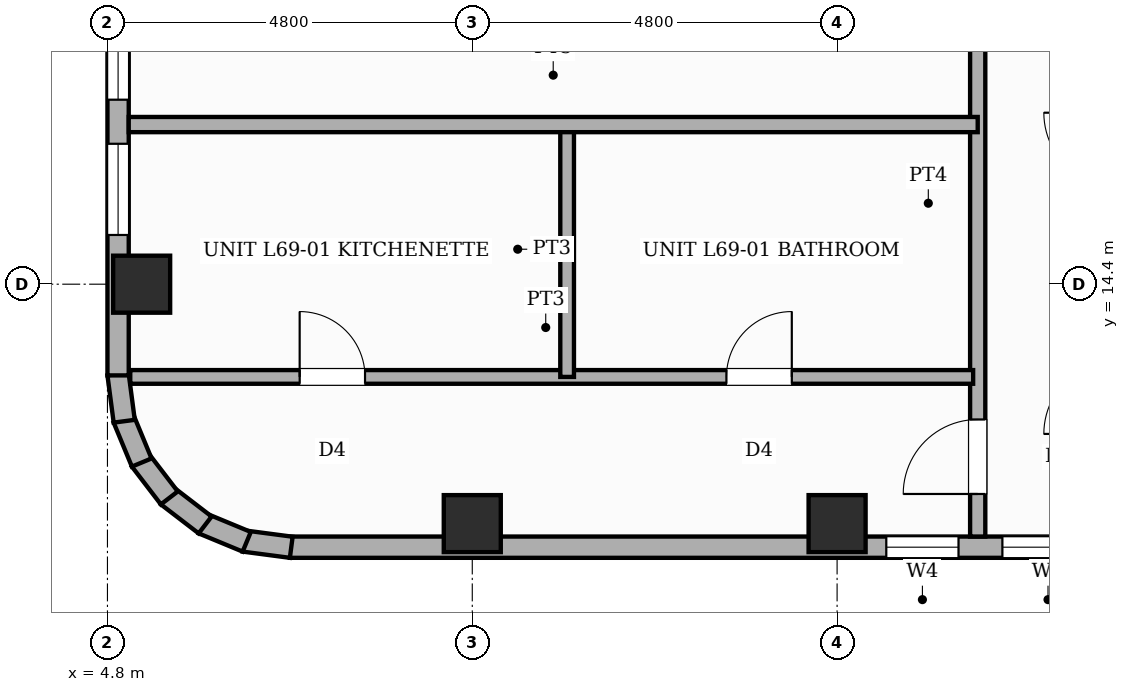
"""IFC4 building model, lengths in metres.
Left out: names, types, materials, properties, quantities, classifications, styles, units other than length and angle.
Written with IfcOpenShell. Run it as: python <this file> out.ifc"""

import sys

from ifc_helpers import new_model, si_unit, direction, frame, frame_2d, origin, origin_2d, place, context, subcontext, project, spatial, rectangle, extrude, element, fill, save


model = new_model("IFC4")
c1 = context("Model", 3, precision=1e-05, world=origin(), true_north=direction((0.0, 1.0)))
c2 = subcontext(c1, "Body", "Model", "MODEL_VIEW")
j1 = project(units=[si_unit("LENGTHUNIT", "METRE"), si_unit("PLANEANGLEUNIT", "RADIAN")], contexts=[c1])
p1 = place(None, origin())
s1 = spatial("IfcSite", under=j1, at=p1, CompositionType="ELEMENT")
p2 = place(p1, origin())
s2 = spatial("IfcBuilding", under=s1, at=p2, CompositionType="ELEMENT")
p3 = place(p2, frame((0.0, 0.0, 265.6)))
s3 = spatial("IfcBuildingStorey", under=s2, at=p3, CompositionType="ELEMENT", Elevation=265.6)
for number, where, z_axis, x_axis in (
    (1, (5.25, 14.4, 0.0), (0.0, 0.0, 1.0), (1.0, 0.0, 0.0)),
    (2, (9.6, 11.25, 0.0), (0.0, 0.0, 1.0), (1.0, 0.0, 0.0)),
    (3, (14.4, 11.25, 0.0), (0.0, 0.0, 1.0), (1.0, 0.0, 0.0)),
):
    element("IfcColumn", number, at=place(p3, frame(where, z_axis=z_axis, x_axis=x_axis)), inside=s3, PredefinedType="COLUMN", context=c2, shape_type="SweptSolid", body=[
        extrude(rectangle(XDim=0.75, YDim=0.75, at=origin_2d()), origin(), (0.0, 0.0, 1.0), 4.3),
    ])
p4 = place(p3, frame((21.6, 10.94, 0.0), z_axis=(0.0, 0.0, 1.0), x_axis=(-1.0, 0.0, 0.0)))
e4 = element("IfcWall", 4, at=p4, inside=s3, PredefinedType="STANDARD", context=c2, shape_type="SweptSolid", body=[
    extrude(rectangle(XDim=14.4, YDim=0.28, at=frame_2d((7.2, 0.0))), origin(), (0.0, 0.0, 1.0), 3.32),
])
p5 = place(p4, frame((5.603, 0.0, 0.8)))
e5 = element("IfcOpeningElement", 5, at=p5, cuts=e4, PredefinedType="OPENING", context=c2, shape_type="SweptSolid", body=[
    extrude(rectangle(XDim=0.95, YDim=1.8, at=frame_2d((0.475, 0.9))), frame((0.0, 0.15, 0.0), z_axis=(0.0, -1.0, 0.0), x_axis=(1.0, 0.0, 0.0)), (0.0, 0.0, 1.0), 0.3),
])
p6 = place(p4, frame((3.825, 0.0, 0.8)))
e6 = element("IfcOpeningElement", 6, at=p6, cuts=e4, PredefinedType="OPENING", context=c2, shape_type="SweptSolid", body=[
    extrude(rectangle(XDim=1.2, YDim=1.8, at=frame_2d((0.6, 0.9))), frame((0.0, 0.15, 0.0), z_axis=(0.0, -1.0, 0.0), x_axis=(1.0, 0.0, 0.0)), (0.0, 0.0, 1.0), 0.3),
])
p7 = place(p4, frame((0.433, 0.0, 0.8)))
e7 = element("IfcOpeningElement", 7, at=p7, cuts=e4, PredefinedType="OPENING", context=c2, shape_type="SweptSolid", body=[
    extrude(rectangle(XDim=1.2, YDim=1.8, at=frame_2d((0.6, 0.9))), frame((0.0, 0.15, 0.0), z_axis=(0.0, -1.0, 0.0), x_axis=(1.0, 0.0, 0.0)), (0.0, 0.0, 1.0), 0.3),
])
p8 = place(p3, frame((7.218, 10.939, 0.0), z_axis=(0.0, 0.0, 1.0), x_axis=(-0.9914410257, 0.130555323746, 0.0)))
e8 = element("IfcWall", 8, at=p8, inside=s3, PredefinedType="STANDARD", context=c2, shape_type="SweptSolid", body=[
    extrude(rectangle(XDim=0.626, YDim=0.28, at=frame_2d((0.313, 0.0))), origin(), (0.0, 0.0, 1.0), 4.04),
])
p9 = place(p3, frame((6.632, 11.011, 0.0), z_axis=(0.0, 0.0, 1.0), x_axis=(-0.923836271867, 0.382787856107, 0.0)))
e9 = element("IfcWall", 9, at=p9, inside=s3, PredefinedType="STANDARD", context=c2, shape_type="SweptSolid", body=[
    extrude(rectangle(XDim=0.626, YDim=0.28, at=frame_2d((0.313, 0.0))), origin(), (0.0, 0.0, 1.0), 4.04),
])
for number, where, z_axis, x_axis in (
    (10, (6.085, 11.233, 0.0), (0.0, 0.0, 1.0), (-0.793, 0.609, 0.0)),
    (11, (5.614, 11.588, 0.0), (0.0, 0.0, 1.0), (-0.609, 0.793, 0.0)),
):
    element("IfcWall", number, at=place(p3, frame(where, z_axis=z_axis, x_axis=x_axis)), inside=s3, PredefinedType="STANDARD", context=c2, shape_type="SweptSolid", body=[
        extrude(rectangle(XDim=0.626, YDim=0.28, at=frame_2d((0.313, 0.0))), origin(), (0.0, 0.0, 1.0), 4.04),
    ])
p10 = place(p3, frame((5.251, 12.054, 0.0), z_axis=(0.0, 0.0, 1.0), x_axis=(-0.382787856107, 0.923836271867, 0.0)))
e12 = element("IfcWall", 12, at=p10, inside=s3, PredefinedType="STANDARD", context=c2, shape_type="SweptSolid", body=[
    extrude(rectangle(XDim=0.626, YDim=0.28, at=frame_2d((0.313, 0.0))), origin(), (0.0, 0.0, 1.0), 4.04),
])
p11 = place(p3, frame((5.021, 12.597, 0.0), z_axis=(0.0, 0.0, 1.0), x_axis=(-0.130555323746, 0.9914410257, 0.0)))
e13 = element("IfcWall", 13, at=p11, inside=s3, PredefinedType="STANDARD", context=c2, shape_type="SweptSolid", body=[
    extrude(rectangle(XDim=0.626, YDim=0.28, at=frame_2d((0.313, 0.0))), origin(), (0.0, 0.0, 1.0), 4.04),
])
p12 = place(p3, frame((4.94, 13.2, 0.0), z_axis=(0.0, 0.0, 1.0), x_axis=(0.0, 1.0, 0.0)))
e14 = element("IfcWall", 14, at=p12, inside=s3, PredefinedType="STANDARD", context=c2, shape_type="SweptSolid", body=[
    extrude(rectangle(XDim=32.4, YDim=0.28, at=frame_2d((16.2, 0.0))), origin(), (0.0, 0.0, 1.0), 3.32),
])
p13 = place(p12, frame((8.1, 0.0, 0.0)))
e15 = element("IfcOpeningElement", 15, at=p13, cuts=e14, PredefinedType="OPENING", context=c2, shape_type="SweptSolid", body=[
    extrude(rectangle(XDim=1.1, YDim=2.15, at=frame_2d((0.55, 1.075))), frame((0.0, 0.15, 0.0), z_axis=(0.0, -1.0, 0.0), x_axis=(1.0, 0.0, 0.0)), (0.0, 0.0, 1.0), 0.3),
])
p14 = place(p12, frame((1.847, 0.0, 0.8)))
e16 = element("IfcOpeningElement", 16, at=p14, cuts=e14, PredefinedType="OPENING", context=c2, shape_type="SweptSolid", body=[
    extrude(rectangle(XDim=1.2, YDim=1.8, at=frame_2d((0.6, 0.9))), frame((0.0, 0.15, 0.0), z_axis=(0.0, -1.0, 0.0), x_axis=(1.0, 0.0, 0.0)), (0.0, 0.0, 1.0), 0.3),
])
p15 = place(p12, frame((3.627, 0.0, 0.8)))
e17 = element("IfcOpeningElement", 17, at=p15, cuts=e14, PredefinedType="OPENING", context=c2, shape_type="SweptSolid", body=[
    extrude(rectangle(XDim=1.65, YDim=1.95, at=frame_2d((0.825, 0.975))), frame((0.0, 0.15, 0.0), z_axis=(0.0, -1.0, 0.0), x_axis=(1.0, 0.0, 0.0)), (0.0, 0.0, 1.0), 0.3),
])
p16 = place(p12, frame((13.083, 0.0, 0.8)))
e18 = element("IfcOpeningElement", 18, at=p16, cuts=e14, PredefinedType="OPENING", context=c2, shape_type="SweptSolid", body=[
    extrude(rectangle(XDim=2.05, YDim=1.95, at=frame_2d((1.025, 0.975))), frame((0.0, 0.15, 0.0), z_axis=(0.0, -1.0, 0.0), x_axis=(1.0, 0.0, 0.0)), (0.0, 0.0, 1.0), 0.3),
])
p17 = place(p12, frame((11.492, 0.0, 0.45)))
e19 = element("IfcOpeningElement", 19, at=p17, cuts=e14, PredefinedType="OPENING", context=c2, shape_type="SweptSolid", body=[
    extrude(rectangle(XDim=0.75, YDim=1.8, at=frame_2d((0.375, 0.9))), frame((0.0, 0.15, 0.0), z_axis=(0.0, -1.0, 0.0), x_axis=(1.0, 0.0, 0.0)), (0.0, 0.0, 1.0), 0.3),
])
p18 = place(p3, frame((16.25, 11.08, 0.0), z_axis=(0.0, 0.0, 1.0), x_axis=(0.0, 1.0, 0.0)))
e20 = element("IfcWall", 20, at=p18, inside=s3, PredefinedType="PARTITIONING", context=c2, shape_type="SweptSolid", body=[
    extrude(rectangle(XDim=12.32, YDim=0.2, at=frame_2d((6.16, 0.0))), origin(), (0.0, 0.0, 1.0), 4.04),
])
p19 = place(p18, frame((0.56, 0.0, 0.0)))
e21 = element("IfcOpeningElement", 21, at=p19, cuts=e20, PredefinedType="OPENING", context=c2, shape_type="SweptSolid", body=[
    extrude(rectangle(XDim=0.98, YDim=2.18, at=frame_2d((0.49, 1.09))), frame((0.0, 0.11, 0.0), z_axis=(0.0, -1.0, 0.0), x_axis=(1.0, 0.0, 0.0)), (0.0, 0.0, 1.0), 0.22),
])
p20 = place(p18, frame((7.23, 0.0, 0.0)))
e22 = element("IfcOpeningElement", 22, at=p20, cuts=e20, PredefinedType="OPENING", context=c2, shape_type="SweptSolid", body=[
    extrude(rectangle(XDim=0.98, YDim=2.18, at=frame_2d((0.49, 1.09))), frame((0.0, 0.11, 0.0), z_axis=(0.0, -1.0, 0.0), x_axis=(1.0, 0.0, 0.0)), (0.0, 0.0, 1.0), 0.22),
])
p21 = place(p3, frame((5.1, 13.18, 0.0), z_axis=(0.0, 0.0, 1.0), x_axis=(1.0, 0.0, 0.0)))
e23 = element("IfcWall", 23, at=p21, inside=s3, PredefinedType="PLUMBINGWALL", context=c2, shape_type="SweptSolid", body=[
    extrude(rectangle(XDim=11.09, YDim=0.18, at=frame_2d((5.545, 0.0))), origin(), (0.0, 0.0, 1.0), 4.04),
])
p22 = place(p21, frame((2.229, 0.0, 0.0)))
e24 = element("IfcOpeningElement", 24, at=p22, cuts=e23, PredefinedType="OPENING", context=c2, shape_type="SweptSolid", body=[
    extrude(rectangle(XDim=0.86, YDim=2.1, at=frame_2d((0.43, 1.05))), frame((0.0, 0.1, 0.0), z_axis=(0.0, -1.0, 0.0), x_axis=(1.0, 0.0, 0.0)), (0.0, 0.0, 1.0), 0.2),
])
p23 = place(p21, frame((7.844, 0.0, 0.0)))
e25 = element("IfcOpeningElement", 25, at=p23, cuts=e23, PredefinedType="OPENING", context=c2, shape_type="SweptSolid", body=[
    extrude(rectangle(XDim=0.86, YDim=2.1, at=frame_2d((0.43, 1.05))), frame((0.0, 0.1, 0.0), z_axis=(0.0, -1.0, 0.0), x_axis=(1.0, 0.0, 0.0)), (0.0, 0.0, 1.0), 0.2),
])
p24 = place(p3, frame((10.848, 13.18, 0.0), z_axis=(0.0, 0.0, 1.0), x_axis=(0.0, 1.0, 0.0)))
e26 = element("IfcWall", 26, at=p24, inside=s3, PredefinedType="PLUMBINGWALL", context=c2, shape_type="SweptSolid", body=[
    extrude(rectangle(XDim=3.36, YDim=0.18, at=frame_2d((1.68, 0.0))), origin(), (0.0, 0.0, 1.0), 4.04),
])
p25 = place(p3, frame((5.08, 16.5, 0.0), z_axis=(0.0, 0.0, 1.0), x_axis=(1.0, 0.0, 0.0)))
e27 = element("IfcWall", 27, at=p25, inside=s3, PredefinedType="SOLIDWALL", context=c2, shape_type="SweptSolid", body=[
    extrude(rectangle(XDim=11.17, YDim=0.2, at=frame_2d((5.585, 0.0))), origin(), (0.0, 0.0, 1.0), 4.04),
])
p26 = place(p5, origin())
e28 = element("IfcWindow", 28, at=p26, inside=s3, PartitioningType="SINGLE_PANEL", PredefinedType="WINDOW", context=c2, shape_type="SweptSolid", body=[
    extrude(rectangle(XDim=0.95, YDim=1.8, at=frame_2d((0.475, 0.9))), frame((0.0, 0.03, 0.0), z_axis=(0.0, -1.0, 0.0), x_axis=(1.0, 0.0, 0.0)), (0.0, 0.0, 1.0), 0.06),
])
fill(e5, e28)
p27 = place(p6, origin())
e29 = element("IfcWindow", 29, at=p27, inside=s3, PartitioningType="SINGLE_PANEL", PredefinedType="WINDOW", context=c2, shape_type="SweptSolid", body=[
    extrude(rectangle(XDim=1.2, YDim=1.8, at=frame_2d((0.6, 0.9))), frame((0.0, 0.03, 0.0), z_axis=(0.0, -1.0, 0.0), x_axis=(1.0, 0.0, 0.0)), (0.0, 0.0, 1.0), 0.06),
])
fill(e6, e29)
p28 = place(p14, origin())
e30 = element("IfcWindow", 30, at=p28, inside=s3, PartitioningType="SINGLE_PANEL", PredefinedType="WINDOW", context=c2, shape_type="SweptSolid", body=[
    extrude(rectangle(XDim=1.2, YDim=1.8, at=frame_2d((0.6, 0.9))), frame((0.0, 0.03, 0.0), z_axis=(0.0, -1.0, 0.0), x_axis=(1.0, 0.0, 0.0)), (0.0, 0.0, 1.0), 0.06),
])
fill(e16, e30)
p29 = place(p15, origin())
e31 = element("IfcWindow", 31, at=p29, inside=s3, PartitioningType="SINGLE_PANEL", PredefinedType="WINDOW", context=c2, shape_type="SweptSolid", body=[
    extrude(rectangle(XDim=1.65, YDim=1.95, at=frame_2d((0.825, 0.975))), frame((0.0, 0.03, 0.0), z_axis=(0.0, -1.0, 0.0), x_axis=(1.0, 0.0, 0.0)), (0.0, 0.0, 1.0), 0.06),
])
fill(e17, e31)
p30 = place(p19, origin())
e32 = element("IfcDoor", 32, at=p30, inside=s3, OperationType="SINGLE_SWING_LEFT", PredefinedType="DOOR", context=c2, shape_type="SweptSolid", body=[
    extrude(rectangle(XDim=0.98, YDim=2.18, at=frame_2d((0.49, 1.09))), frame((0.0, 0.025, 0.0), z_axis=(0.0, -1.0, 0.0), x_axis=(1.0, 0.0, 0.0)), (0.0, 0.0, 1.0), 0.05),
])
fill(e21, e32)
p31 = place(p22, origin())
e33 = element("IfcDoor", 33, at=p31, inside=s3, OperationType="SINGLE_SWING_LEFT", PredefinedType="DOOR", context=c2, shape_type="SweptSolid", body=[
    extrude(rectangle(XDim=0.86, YDim=2.1, at=frame_2d((0.43, 1.05))), frame((0.0, 0.025, 0.0), z_axis=(0.0, -1.0, 0.0), x_axis=(1.0, 0.0, 0.0)), (0.0, 0.0, 1.0), 0.05),
])
fill(e24, e33)
p32 = place(p23, origin())
e34 = element("IfcDoor", 34, at=p32, inside=s3, OperationType="SINGLE_SWING_RIGHT", PredefinedType="DOOR", context=c2, shape_type="SweptSolid", body=[
    extrude(rectangle(XDim=0.86, YDim=2.1, at=frame_2d((0.43, 1.05))), frame((0.0, 0.025, 0.0), z_axis=(0.0, -1.0, 0.0), x_axis=(1.0, 0.0, 0.0)), (0.0, 0.0, 1.0), 0.05),
])
fill(e25, e34)
save(model, sys.argv[1])
